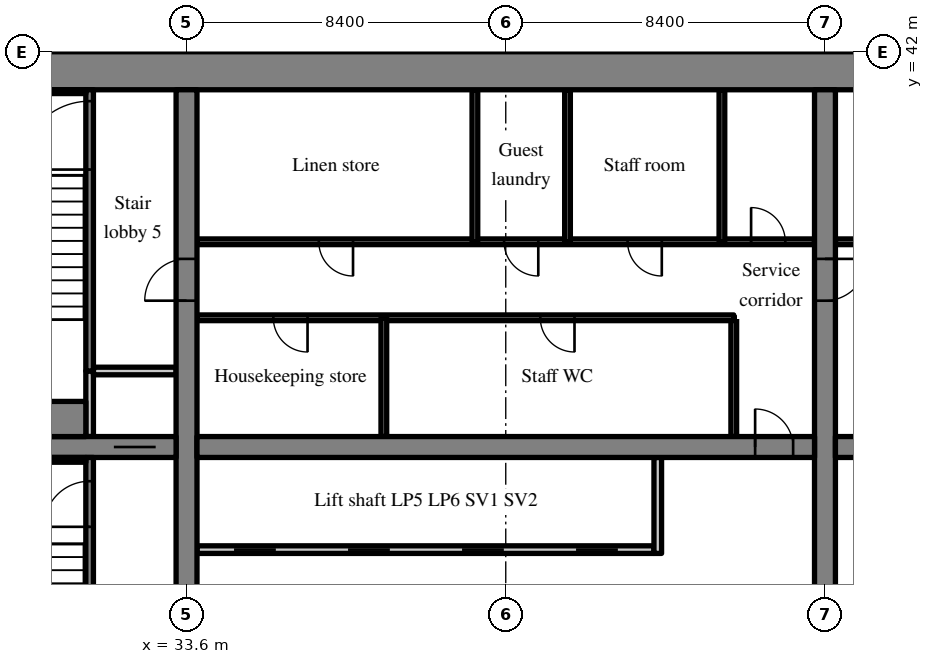
"""IFC4 building model, lengths in metres.
Left out: names, types, materials, properties, quantities, classifications, styles, units other than length and angle.
Written with IfcOpenShell. Run it as: python <this file> out.ifc"""

import sys

from ifc_helpers import new_model, si_unit, direction, frame, frame_2d, origin, place, context, subcontext, project, spatial, rectangle, extrude, source, transform, mapped, element, fill, save


model = new_model("IFC4")
c1 = context("Model", 3, precision=1e-05, world=origin(), true_north=direction((0.0, 1.0)))
c2 = subcontext(c1, "Body", "Model", "MODEL_VIEW")
j1 = project(units=[si_unit("LENGTHUNIT", "METRE"), si_unit("PLANEANGLEUNIT", "RADIAN")], contexts=[c1])
p1 = place(None, origin())
s1 = spatial("IfcSite", under=j1, at=p1, CompositionType="ELEMENT")
p2 = place(p1, origin())
s2 = spatial("IfcBuilding", under=s1, at=p2, CompositionType="ELEMENT")
p3 = place(p2, frame((0.0, 0.0, 62.0)))
s3 = spatial("IfcBuildingStorey", under=s2, at=p3, CompositionType="ELEMENT", Elevation=62.0)
m1 = source(origin(), c2, "Body", "SweptSolid", [
    extrude(rectangle(XDim=50.4, YDim=1.0, at=frame_2d((25.2, 0.0))), origin(), (0.0, 0.0, 1.0), 3.52),
])
p4 = place(p3, frame((25.2, 41.5, 0.0), z_axis=(0.0, 0.0, 1.0), x_axis=(1.0, 0.0, 0.0)))
e1 = element("IfcWall", 1, at=p4, inside=s3, PredefinedType="SHEAR", context=c2, shape_type="MappedRepresentation", body=[
    mapped(m1, transform((0.0, 0.0, 0.0), scale=1.0)),
])
m2 = source(origin(), c2, "Body", "SweptSolid", [
    extrude(rectangle(XDim=18.0, YDim=0.55, at=frame_2d((9.0, 0.0))), origin(), (0.0, 0.0, 1.0), 3.52),
])
p5 = place(p3, frame((33.6, 23.0, 0.0), z_axis=(0.0, 0.0, 1.0), x_axis=(0.0, 1.0, 0.0)))
e2 = element("IfcWall", 2, at=p5, inside=s3, PredefinedType="SHEAR", context=c2, shape_type="MappedRepresentation", body=[
    mapped(m2, transform((0.0, 0.0, 0.0), scale=1.0)),
])
m3 = source(origin(), c2, "Body", "SweptSolid", [
    extrude(rectangle(XDim=1.1, YDim=2.1, at=frame_2d((0.55, 1.05))), frame((0.0, 0.285, 0.0), z_axis=(0.0, -1.0, 0.0), x_axis=(1.0, 0.0, 0.0)), (0.0, 0.0, 1.0), 0.57),
])
p6 = place(p5, frame((12.45, 0.0, 0.0)))
e3 = element("IfcOpeningElement", 3, at=p6, cuts=e2, PredefinedType="OPENING", context=c2, shape_type="MappedRepresentation", body=[
    mapped(m3, transform((0.0, 0.0, 0.0), scale=1.0)),
])
p7 = place(p3, frame((50.4, 23.0, 0.0), z_axis=(0.0, 0.0, 1.0), x_axis=(0.0, 1.0, 0.0)))
e4 = element("IfcWall", 4, at=p7, inside=s3, PredefinedType="SHEAR", context=c2, shape_type="MappedRepresentation", body=[
    mapped(m2, transform((0.0, 0.0, 0.0), scale=1.0)),
])
p8 = place(p7, frame((12.45, 0.0, 0.0)))
e5 = element("IfcOpeningElement", 5, at=p8, cuts=e4, PredefinedType="OPENING", context=c2, shape_type="MappedRepresentation", body=[
    mapped(m3, transform((0.0, 0.0, 0.0), scale=1.0)),
])
m4 = source(origin(), c2, "Body", "SweptSolid", [
    extrude(rectangle(XDim=7.125, YDim=0.55, at=frame_2d((3.562, 0.0))), origin(), (0.0, 0.0, 1.0), 3.52),
])
p9 = place(p3, frame((26.2, 31.6, 0.0), z_axis=(0.0, 0.0, 1.0), x_axis=(1.0, 0.0, 0.0)))
e6 = element("IfcWall", 6, at=p9, inside=s3, PredefinedType="SHEAR", context=c2, shape_type="MappedRepresentation", body=[
    mapped(m4, transform((0.0, 0.0, 0.0), scale=1.0)),
])
p10 = place(p9, frame((5.488, 0.0, 0.0)))
e7 = element("IfcOpeningElement", 7, at=p10, cuts=e6, PredefinedType="OPENING", context=c2, shape_type="MappedRepresentation", body=[
    mapped(m3, transform((0.0, 0.0, 0.0), scale=1.0)),
])
m5 = source(origin(), c2, "Body", "SweptSolid", [
    extrude(rectangle(XDim=16.25, YDim=0.55, at=frame_2d((8.125, 0.0))), origin(), (0.0, 0.0, 1.0), 3.52),
])
p11 = place(p3, frame((33.875, 31.6, 0.0), z_axis=(0.0, 0.0, 1.0), x_axis=(1.0, 0.0, 0.0)))
e8 = element("IfcWall", 8, at=p11, inside=s3, PredefinedType="SHEAR", context=c2, shape_type="MappedRepresentation", body=[
    mapped(m5, transform((0.0, 0.0, 0.0), scale=1.0)),
])
m6 = source(origin(), c2, "Body", "SweptSolid", [
    extrude(rectangle(XDim=1.0, YDim=2.1, at=frame_2d((0.5, 1.05))), frame((0.0, 0.285, 0.0), z_axis=(0.0, -1.0, 0.0), x_axis=(1.0, 0.0, 0.0)), (0.0, 0.0, 1.0), 0.57),
])
p12 = place(p11, frame((14.687, 0.0, 0.0)))
e9 = element("IfcOpeningElement", 9, at=p12, cuts=e8, PredefinedType="OPENING", context=c2, shape_type="MappedRepresentation", body=[
    mapped(m6, transform((0.0, 0.0, 0.0), scale=1.0)),
])
p13 = place(p3, frame((50.675, 31.6, 0.0), z_axis=(0.0, 0.0, 1.0), x_axis=(1.0, 0.0, 0.0)))
e10 = element("IfcWall", 10, at=p13, inside=s3, PredefinedType="SHEAR", context=c2, shape_type="MappedRepresentation", body=[
    mapped(m5, transform((0.0, 0.0, 0.0), scale=1.0)),
])
p14 = place(p13, frame((0.562, 0.0, 0.0)))
e11 = element("IfcOpeningElement", 11, at=p14, cuts=e10, PredefinedType="OPENING", context=c2, shape_type="MappedRepresentation", body=[
    mapped(m6, transform((0.0, 0.0, 0.0), scale=1.0)),
])
m7 = source(origin(), c2, "Body", "SweptSolid", [
    extrude(rectangle(XDim=12.025, YDim=0.2, at=frame_2d((6.012, 0.0))), origin(), (0.0, 0.0, 1.0), 3.52),
])
p15 = place(p3, frame((33.875, 28.9, 0.0), z_axis=(0.0, 0.0, 1.0), x_axis=(1.0, 0.0, 0.0)))
e12 = element("IfcWall", 12, at=p15, inside=s3, PredefinedType="SOLIDWALL", context=c2, shape_type="MappedRepresentation", body=[
    mapped(m7, transform((0.0, 0.0, 0.0), scale=1.0)),
])
m8 = source(origin(), c2, "Body", "SweptSolid", [
    extrude(rectangle(XDim=1.1, YDim=2.1, at=frame_2d((0.55, 1.05))), frame((0.0, 0.11, 0.0), z_axis=(0.0, -1.0, 0.0), x_axis=(1.0, 0.0, 0.0)), (0.0, 0.0, 1.0), 0.22),
])
p16 = place(p15, frame((0.975, 0.0, 0.0)))
e13 = element("IfcOpeningElement", 13, at=p16, cuts=e12, PredefinedType="OPENING", context=c2, shape_type="MappedRepresentation", body=[
    mapped(m8, transform((0.0, 0.0, 0.0), scale=1.0)),
])
p17 = place(p15, frame((3.975, 0.0, 0.0)))
e14 = element("IfcOpeningElement", 14, at=p17, cuts=e12, PredefinedType="OPENING", context=c2, shape_type="MappedRepresentation", body=[
    mapped(m8, transform((0.0, 0.0, 0.0), scale=1.0)),
])
p18 = place(p15, frame((6.975, 0.0, 0.0)))
e15 = element("IfcOpeningElement", 15, at=p18, cuts=e12, PredefinedType="OPENING", context=c2, shape_type="MappedRepresentation", body=[
    mapped(m8, transform((0.0, 0.0, 0.0), scale=1.0)),
])
p19 = place(p15, frame((9.975, 0.0, 0.0)))
e16 = element("IfcOpeningElement", 16, at=p19, cuts=e12, PredefinedType="OPENING", context=c2, shape_type="MappedRepresentation", body=[
    mapped(m8, transform((0.0, 0.0, 0.0), scale=1.0)),
])
m9 = source(origin(), c2, "Body", "SweptSolid", [
    extrude(rectangle(XDim=2.525, YDim=0.2, at=frame_2d((1.262, 0.0))), origin(), (0.0, 0.0, 1.0), 3.52),
])
p20 = place(p3, frame((46.0, 28.8, 0.0), z_axis=(0.0, 0.0, 1.0), x_axis=(0.0, 1.0, 0.0)))
e17 = element("IfcWall", 17, at=p20, inside=s3, PredefinedType="SOLIDWALL", context=c2, shape_type="MappedRepresentation", body=[
    mapped(m9, transform((0.0, 0.0, 0.0), scale=1.0)),
])
m10 = source(origin(), c2, "Body", "SweptSolid", [
    extrude(rectangle(XDim=3.125, YDim=0.15, at=frame_2d((1.562, 0.0))), origin(), (0.0, 0.0, 1.0), 3.52),
])
p21 = place(p3, frame((48.0, 31.875, 0.0), z_axis=(0.0, 0.0, 1.0), x_axis=(0.0, 1.0, 0.0)))
e18 = element("IfcWall", 18, at=p21, inside=s3, PredefinedType="PARTITIONING", context=c2, shape_type="MappedRepresentation", body=[
    mapped(m10, transform((0.0, 0.0, 0.0), scale=1.0)),
])
m11 = source(origin(), c2, "Body", "SweptSolid", [
    extrude(rectangle(XDim=14.125, YDim=0.15, at=frame_2d((7.062, 0.0))), origin(), (0.0, 0.0, 1.0), 3.52),
])
p22 = place(p3, frame((33.875, 35.0, 0.0), z_axis=(0.0, 0.0, 1.0), x_axis=(1.0, 0.0, 0.0)))
e19 = element("IfcWall", 19, at=p22, inside=s3, PredefinedType="PARTITIONING", context=c2, shape_type="MappedRepresentation", body=[
    mapped(m11, transform((0.0, 0.0, 0.0), scale=1.0)),
])
m12 = source(origin(), c2, "Body", "SweptSolid", [
    extrude(rectangle(XDim=0.9, YDim=2.1, at=frame_2d((0.45, 1.05))), frame((0.0, 0.085, 0.0), z_axis=(0.0, -1.0, 0.0), x_axis=(1.0, 0.0, 0.0)), (0.0, 0.0, 1.0), 0.17),
])
p23 = place(p22, frame((2.009, 0.0, 0.0)))
e20 = element("IfcOpeningElement", 20, at=p23, cuts=e19, PredefinedType="OPENING", context=c2, shape_type="MappedRepresentation", body=[
    mapped(m12, transform((0.0, 0.0, 0.0), scale=1.0)),
])
p24 = place(p22, frame((9.034, 0.0, 0.0)))
e21 = element("IfcOpeningElement", 21, at=p24, cuts=e19, PredefinedType="OPENING", context=c2, shape_type="MappedRepresentation", body=[
    mapped(m12, transform((0.0, 0.0, 0.0), scale=1.0)),
])
m13 = source(origin(), c2, "Body", "SweptSolid", [
    extrude(rectangle(XDim=16.25, YDim=0.15, at=frame_2d((8.125, 0.0))), origin(), (0.0, 0.0, 1.0), 3.52),
])
p25 = place(p3, frame((33.875, 37.0, 0.0), z_axis=(0.0, 0.0, 1.0), x_axis=(1.0, 0.0, 0.0)))
e22 = element("IfcWall", 22, at=p25, inside=s3, PredefinedType="PARTITIONING", context=c2, shape_type="MappedRepresentation", body=[
    mapped(m13, transform((0.0, 0.0, 0.0), scale=1.0)),
])
p26 = place(p25, frame((3.206, 0.0, 0.0)))
e23 = element("IfcOpeningElement", 23, at=p26, cuts=e22, PredefinedType="OPENING", context=c2, shape_type="MappedRepresentation", body=[
    mapped(m12, transform((0.0, 0.0, 0.0), scale=1.0)),
])
p27 = place(p25, frame((8.081, 0.0, 0.0)))
e24 = element("IfcOpeningElement", 24, at=p27, cuts=e22, PredefinedType="OPENING", context=c2, shape_type="MappedRepresentation", body=[
    mapped(m12, transform((0.0, 0.0, 0.0), scale=1.0)),
])
p28 = place(p25, frame((11.331, 0.0, 0.0)))
e25 = element("IfcOpeningElement", 25, at=p28, cuts=e22, PredefinedType="OPENING", context=c2, shape_type="MappedRepresentation", body=[
    mapped(m12, transform((0.0, 0.0, 0.0), scale=1.0)),
])
p29 = place(p25, frame((14.581, 0.0, 0.0)))
e26 = element("IfcOpeningElement", 26, at=p29, cuts=e22, PredefinedType="OPENING", context=c2, shape_type="MappedRepresentation", body=[
    mapped(m12, transform((0.0, 0.0, 0.0), scale=1.0)),
])
p30 = place(p3, frame((38.792, 31.875, 0.0), z_axis=(0.0, 0.0, 1.0), x_axis=(0.0, 1.0, 0.0)))
e27 = element("IfcWall", 27, at=p30, inside=s3, PredefinedType="PARTITIONING", context=c2, shape_type="MappedRepresentation", body=[
    mapped(m10, transform((0.0, 0.0, 0.0), scale=1.0)),
])
m14 = source(origin(), c2, "Body", "SweptSolid", [
    extrude(rectangle(XDim=4.0, YDim=0.15, at=frame_2d((2.0, 0.0))), origin(), (0.0, 0.0, 1.0), 3.52),
])
for number, where, z_axis, x_axis in (
    (28, (41.188, 37.0, 0.0), (0.0, 0.0, 1.0), (0.0, 1.0, 0.0)),
    (29, (43.625, 37.0, 0.0), (0.0, 0.0, 1.0), (0.0, 1.0, 0.0)),
    (30, (47.688, 37.0, 0.0), (0.0, 0.0, 1.0), (0.0, 1.0, 0.0)),
):
    element("IfcWall", number, at=place(p3, frame(where, z_axis=z_axis, x_axis=x_axis)), inside=s3, PredefinedType="PARTITIONING", context=c2, shape_type="MappedRepresentation", body=[
        mapped(m14, transform((0.0, 0.0, 0.0), scale=1.0)),
    ])
p31 = place(p3, frame((66.925, 37.0, 0.0), z_axis=(0.0, 0.0, 1.0), x_axis=(-1.0, 0.0, 0.0)))
e31 = element("IfcWall", 31, at=p31, inside=s3, PredefinedType="PARTITIONING", context=c2, shape_type="MappedRepresentation", body=[
    mapped(m13, transform((0.0, 0.0, 0.0), scale=1.0)),
])
p32 = place(p31, frame((0.769, 0.0, 0.0)))
e32 = element("IfcOpeningElement", 32, at=p32, cuts=e31, PredefinedType="OPENING", context=c2, shape_type="MappedRepresentation", body=[
    mapped(m12, transform((0.0, 0.0, 0.0), scale=1.0)),
])
p33 = place(p31, frame((3.613, 0.0, 0.0)))
e33 = element("IfcOpeningElement", 33, at=p33, cuts=e31, PredefinedType="OPENING", context=c2, shape_type="MappedRepresentation", body=[
    mapped(m12, transform((0.0, 0.0, 0.0), scale=1.0)),
])
p34 = place(p31, frame((9.3, 0.0, 0.0)))
e34 = element("IfcOpeningElement", 34, at=p34, cuts=e31, PredefinedType="OPENING", context=c2, shape_type="MappedRepresentation", body=[
    mapped(m12, transform((0.0, 0.0, 0.0), scale=1.0)),
])
p35 = place(p31, frame((14.581, 0.0, 0.0)))
e35 = element("IfcOpeningElement", 35, at=p35, cuts=e31, PredefinedType="OPENING", context=c2, shape_type="MappedRepresentation", body=[
    mapped(m12, transform((0.0, 0.0, 0.0), scale=1.0)),
])
m15 = source(origin(), c2, "Body", "SweptSolid", [
    extrude(rectangle(XDim=8.325, YDim=0.2, at=frame_2d((4.163, 0.0))), origin(), (0.0, 0.0, 1.0), 3.52),
])
p36 = place(p3, frame((31.05, 23.0, 0.0), z_axis=(0.0, 0.0, 1.0), x_axis=(0.0, 1.0, 0.0)))
e36 = element("IfcWall", 36, at=p36, inside=s3, PredefinedType="SOLIDWALL", context=c2, shape_type="MappedRepresentation", body=[
    mapped(m15, transform((0.0, 0.0, 0.0), scale=1.0)),
])
m16 = source(origin(), c2, "Body", "SweptSolid", [
    extrude(rectangle(XDim=1.2, YDim=2.1, at=frame_2d((0.6, 1.05))), frame((0.0, 0.11, 0.0), z_axis=(0.0, -1.0, 0.0), x_axis=(1.0, 0.0, 0.0)), (0.0, 0.0, 1.0), 0.22),
])
p37 = place(p36, frame((6.5, 0.0, 0.0)))
e37 = element("IfcOpeningElement", 37, at=p37, cuts=e36, PredefinedType="OPENING", context=c2, shape_type="MappedRepresentation", body=[
    mapped(m16, transform((0.0, 0.0, 0.0), scale=1.0)),
])
m17 = source(origin(), c2, "Body", "SweptSolid", [
    extrude(rectangle(XDim=1.725, YDim=0.2, at=frame_2d((0.863, 0.0))), origin(), (0.0, 0.0, 1.0), 3.52),
])
p38 = place(p3, frame((31.05, 31.875, 0.0), z_axis=(0.0, 0.0, 1.0), x_axis=(0.0, 1.0, 0.0)))
e38 = element("IfcWall", 38, at=p38, inside=s3, PredefinedType="SOLIDWALL", context=c2, shape_type="MappedRepresentation", body=[
    mapped(m17, transform((0.0, 0.0, 0.0), scale=1.0)),
])
m18 = source(origin(), c2, "Body", "SweptSolid", [
    extrude(rectangle(XDim=2.175, YDim=0.2, at=frame_2d((1.087, 0.0))), origin(), (0.0, 0.0, 1.0), 3.52),
])
p39 = place(p3, frame((31.15, 33.6, 0.0), z_axis=(0.0, 0.0, 1.0), x_axis=(1.0, 0.0, 0.0)))
e39 = element("IfcWall", 39, at=p39, inside=s3, PredefinedType="SOLIDWALL", context=c2, shape_type="MappedRepresentation", body=[
    mapped(m18, transform((0.0, 0.0, 0.0), scale=1.0)),
])
m19 = source(origin(), c2, "Body", "SweptSolid", [
    extrude(rectangle(XDim=7.4, YDim=0.2, at=frame_2d((3.7, 0.0))), origin(), (0.0, 0.0, 1.0), 3.52),
])
p40 = place(p3, frame((31.05, 33.6, 0.0), z_axis=(0.0, 0.0, 1.0), x_axis=(0.0, 1.0, 0.0)))
e40 = element("IfcWall", 40, at=p40, inside=s3, PredefinedType="SOLIDWALL", context=c2, shape_type="MappedRepresentation", body=[
    mapped(m19, transform((0.0, 0.0, 0.0), scale=1.0)),
])
m20 = source(origin(), c2, "Body", "SweptSolid", [
    extrude(rectangle(XDim=1.8, YDim=2.1, at=frame_2d((0.9, 1.05))), frame((0.0, 0.11, 0.0), z_axis=(0.0, -1.0, 0.0), x_axis=(1.0, 0.0, 0.0)), (0.0, 0.0, 1.0), 0.22),
])
p41 = place(p40, frame((5.3, 0.0, 0.0)))
e41 = element("IfcOpeningElement", 41, at=p41, cuts=e40, PredefinedType="OPENING", context=c2, shape_type="MappedRepresentation", body=[
    mapped(m20, transform((0.0, 0.0, 0.0), scale=1.0)),
])
m21 = source(origin(), c2, "Body", "SweptSolid", [
    extrude(rectangle(XDim=4.75, YDim=0.125, at=frame_2d((2.375, 0.0))), origin(), (0.0, 0.0, 1.0), 3.52),
])
p42 = place(p3, frame((26.2, 31.262, 0.0), z_axis=(0.0, 0.0, 1.0), x_axis=(1.0, 0.0, 0.0)))
e42 = element("IfcWall", 42, at=p42, inside=s3, PredefinedType="SOLIDWALL", context=c2, shape_type="MappedRepresentation", body=[
    mapped(m21, transform((0.0, 0.0, 0.0), scale=1.0)),
])
m22 = source(origin(), c2, "Body", "SweptSolid", [
    extrude(rectangle(XDim=4.75, YDim=0.1, at=frame_2d((2.375, 0.0))), origin(), (0.0, 0.0, 1.0), 3.52),
])
p43 = place(p3, frame((26.2, 40.95, 0.0), z_axis=(0.0, 0.0, 1.0), x_axis=(1.0, 0.0, 0.0)))
e43 = element("IfcWall", 43, at=p43, inside=s3, PredefinedType="SOLIDWALL", context=c2, shape_type="MappedRepresentation", body=[
    mapped(m22, transform((0.0, 0.0, 0.0), scale=1.0)),
])
m23 = source(origin(), c2, "Body", "SweptSolid", [
    extrude(rectangle(XDim=4.75, YDim=0.925, at=frame_2d((2.375, 0.0))), origin(), (0.0, 0.0, 1.0), 3.52),
])
p44 = place(p3, frame((26.2, 32.337, 0.0), z_axis=(0.0, 0.0, 1.0), x_axis=(1.0, 0.0, 0.0)))
e44 = element("IfcWall", 44, at=p44, inside=s3, PredefinedType="SOLIDWALL", context=c2, shape_type="MappedRepresentation", body=[
    mapped(m23, transform((0.0, 0.0, 0.0), scale=1.0)),
])
m24 = source(origin(), c2, "Body", "SweptSolid", [
    extrude(rectangle(XDim=1.0, YDim=2.1, at=frame_2d((0.5, 1.05))), frame((0.0, 0.025, 0.0), z_axis=(0.0, -1.0, 0.0), x_axis=(1.0, 0.0, 0.0)), (0.0, 0.0, 1.0), 0.05),
])
p45 = place(p12, origin())
e45 = element("IfcDoor", 45, at=p45, inside=s3, OperationType="SINGLE_SWING_LEFT", PredefinedType="DOOR", context=c2, shape_type="MappedRepresentation", body=[
    mapped(m24, transform((0.0, 0.0, 0.0), scale=1.0)),
])
fill(e9, e45)
m25 = source(origin(), c2, "Body", "SweptSolid", [
    extrude(rectangle(XDim=1.1, YDim=2.1, at=frame_2d((0.55, 1.05))), frame((0.0, 0.025, 0.0), z_axis=(0.0, -1.0, 0.0), x_axis=(1.0, 0.0, 0.0)), (0.0, 0.0, 1.0), 0.05),
])
p46 = place(p16, origin())
e46 = element("IfcDoor", 46, at=p46, inside=s3, OperationType="SLIDING_TO_LEFT", PredefinedType="DOOR", context=c2, shape_type="MappedRepresentation", body=[
    mapped(m25, transform((0.0, 0.0, 0.0), scale=1.0)),
])
fill(e13, e46)
p47 = place(p17, origin())
e47 = element("IfcDoor", 47, at=p47, inside=s3, OperationType="SLIDING_TO_RIGHT", PredefinedType="DOOR", context=c2, shape_type="MappedRepresentation", body=[
    mapped(m25, transform((0.0, 0.0, 0.0), scale=1.0)),
])
fill(e14, e47)
p48 = place(p18, origin())
e48 = element("IfcDoor", 48, at=p48, inside=s3, OperationType="SLIDING_TO_LEFT", PredefinedType="DOOR", context=c2, shape_type="MappedRepresentation", body=[
    mapped(m25, transform((0.0, 0.0, 0.0), scale=1.0)),
])
fill(e15, e48)
p49 = place(p19, origin())
e49 = element("IfcDoor", 49, at=p49, inside=s3, OperationType="SLIDING_TO_RIGHT", PredefinedType="DOOR", context=c2, shape_type="MappedRepresentation", body=[
    mapped(m25, transform((0.0, 0.0, 0.0), scale=1.0)),
])
fill(e16, e49)
m26 = source(origin(), c2, "Body", "SweptSolid", [
    extrude(rectangle(XDim=0.9, YDim=2.1, at=frame_2d((0.45, 1.05))), frame((0.0, 0.025, 0.0), z_axis=(0.0, -1.0, 0.0), x_axis=(1.0, 0.0, 0.0)), (0.0, 0.0, 1.0), 0.05),
])
p50 = place(p23, origin())
e50 = element("IfcDoor", 50, at=p50, inside=s3, OperationType="SINGLE_SWING_RIGHT", PredefinedType="DOOR", context=c2, shape_type="MappedRepresentation", body=[
    mapped(m26, transform((0.0, 0.0, 0.0), scale=1.0)),
])
fill(e20, e50)
p51 = place(p24, origin())
e51 = element("IfcDoor", 51, at=p51, inside=s3, OperationType="SINGLE_SWING_RIGHT", PredefinedType="DOOR", context=c2, shape_type="MappedRepresentation", body=[
    mapped(m26, transform((0.0, 0.0, 0.0), scale=1.0)),
])
fill(e21, e51)
p52 = place(p26, origin())
e52 = element("IfcDoor", 52, at=p52, inside=s3, OperationType="SINGLE_SWING_RIGHT", PredefinedType="DOOR", context=c2, shape_type="MappedRepresentation", body=[
    mapped(m26, transform((0.0, 0.0, 0.0), scale=1.0)),
])
fill(e23, e52)
p53 = place(p27, origin())
e53 = element("IfcDoor", 53, at=p53, inside=s3, OperationType="SINGLE_SWING_RIGHT", PredefinedType="DOOR", context=c2, shape_type="MappedRepresentation", body=[
    mapped(m26, transform((0.0, 0.0, 0.0), scale=1.0)),
])
fill(e24, e53)
p54 = place(p28, origin())
e54 = element("IfcDoor", 54, at=p54, inside=s3, OperationType="SINGLE_SWING_RIGHT", PredefinedType="DOOR", context=c2, shape_type="MappedRepresentation", body=[
    mapped(m26, transform((0.0, 0.0, 0.0), scale=1.0)),
])
fill(e25, e54)
p55 = place(p29, origin())
e55 = element("IfcDoor", 55, at=p55, inside=s3, OperationType="SINGLE_SWING_LEFT", PredefinedType="DOOR", context=c2, shape_type="MappedRepresentation", body=[
    mapped(m26, transform((0.0, 0.0, 0.0), scale=1.0)),
])
fill(e26, e55)
m27 = source(origin(), c2, "Body", "SweptSolid", [
    extrude(rectangle(XDim=1.2, YDim=2.1, at=frame_2d((0.6, 1.05))), frame((0.0, 0.025, 0.0), z_axis=(0.0, -1.0, 0.0), x_axis=(1.0, 0.0, 0.0)), (0.0, 0.0, 1.0), 0.05),
])
p56 = place(p37, origin())
e56 = element("IfcDoor", 56, at=p56, inside=s3, OperationType="SINGLE_SWING_LEFT", PredefinedType="DOOR", context=c2, shape_type="MappedRepresentation", body=[
    mapped(m27, transform((0.0, 0.0, 0.0), scale=1.0)),
])
fill(e37, e56)
p57 = place(p10, origin())
e57 = element("IfcDoor", 57, at=p57, inside=s3, OperationType="SLIDING_TO_RIGHT", PredefinedType="DOOR", context=c2, shape_type="MappedRepresentation", body=[
    mapped(m25, transform((0.0, 0.0, 0.0), scale=1.0)),
])
fill(e7, e57)
m28 = source(origin(), c2, "Body", "SweptSolid", [
    extrude(rectangle(XDim=1.8, YDim=2.1, at=frame_2d((0.9, 1.05))), frame((0.0, 0.025, 0.0), z_axis=(0.0, -1.0, 0.0), x_axis=(1.0, 0.0, 0.0)), (0.0, 0.0, 1.0), 0.05),
])
p58 = place(p41, origin())
e58 = element("IfcDoor", 58, at=p58, inside=s3, OperationType="SINGLE_SWING_LEFT", PredefinedType="DOOR", context=c2, shape_type="MappedRepresentation", body=[
    mapped(m28, transform((0.0, 0.0, 0.0), scale=1.0)),
])
fill(e41, e58)
p59 = place(p6, origin())
e59 = element("IfcDoor", 59, at=p59, inside=s3, OperationType="SINGLE_SWING_LEFT", PredefinedType="DOOR", context=c2, shape_type="MappedRepresentation", body=[
    mapped(m25, transform((0.0, 0.0, 0.0), scale=1.0)),
])
fill(e3, e59)
p60 = place(p8, origin())
e60 = element("IfcDoor", 60, at=p60, inside=s3, OperationType="SINGLE_SWING_RIGHT", PredefinedType="DOOR", context=c2, shape_type="MappedRepresentation", body=[
    mapped(m25, transform((0.0, 0.0, 0.0), scale=1.0)),
])
fill(e5, e60)
save(model, sys.argv[1])
